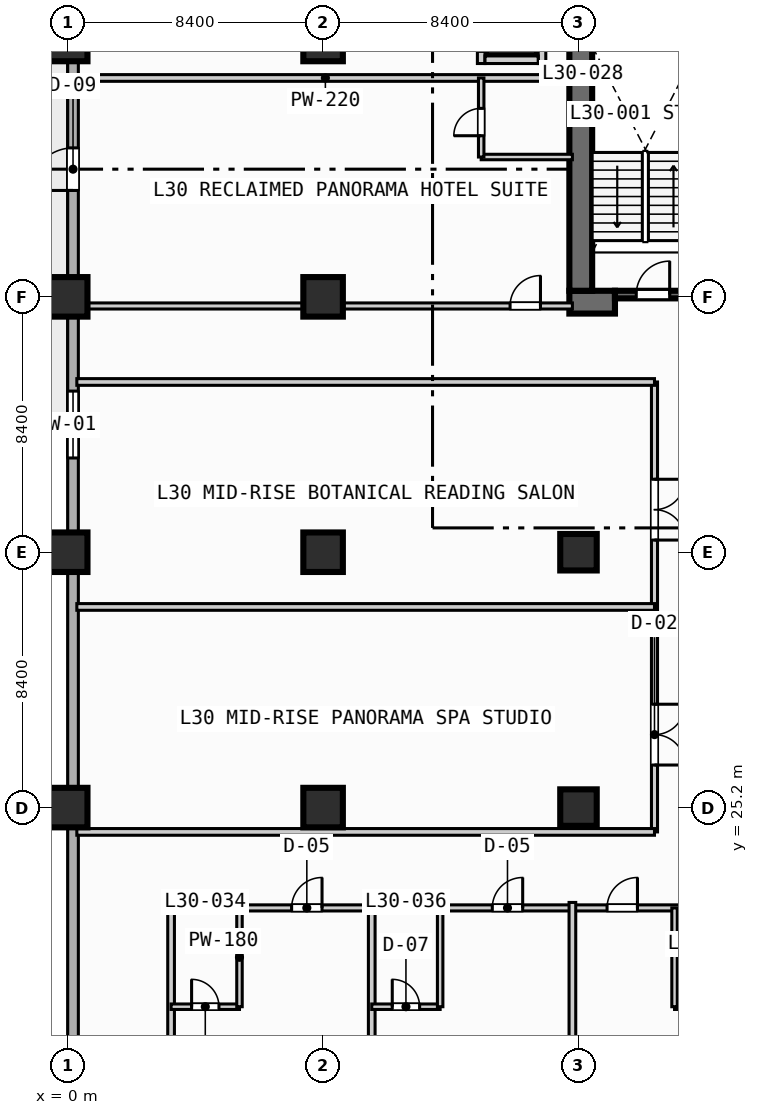
"""IFC4 building model, lengths in metres.
Left out: names, types, materials, properties, quantities, classifications, styles, units other than length and angle.
Written with IfcOpenShell. Run it as: python <this file> out.ifc"""

import sys

from ifc_helpers import new_model, si_unit, direction, frame, frame_2d, origin, origin_2d, place, context, subcontext, project, spatial, rectangle, extrude, element, fill, save


model = new_model("IFC4")
c1 = context("Model", 3, precision=1e-05, world=origin(), true_north=direction((0.0, 1.0)))
c2 = subcontext(c1, "Body", "Model", "MODEL_VIEW")
j1 = project(units=[si_unit("LENGTHUNIT", "METRE"), si_unit("PLANEANGLEUNIT", "RADIAN")], contexts=[c1])
p1 = place(None, origin())
s1 = spatial("IfcSite", under=j1, at=p1, CompositionType="ELEMENT")
p2 = place(p1, origin())
s2 = spatial("IfcBuilding", under=s1, at=p2, CompositionType="ELEMENT")
p3 = place(p2, frame((0.0, 0.0, 126.6)))
s3 = spatial("IfcBuildingStorey", under=s2, at=p3, CompositionType="ELEMENT", Elevation=126.6)
p4 = place(p3, frame((16.5, 41.825, 0.0), z_axis=(0.0, 0.0, 1.0), x_axis=(1.0, 0.0, 0.0)))
e1 = element("IfcWall", 1, at=p4, inside=s3, PredefinedType="SHEAR", context=c2, shape_type="SweptSolid", body=[
    extrude(rectangle(XDim=1.5, YDim=0.75, at=frame_2d((0.75, 0.0))), origin(), (0.0, 0.0, 1.0), 3.55),
])
p5 = place(p3, frame((16.875, 42.2, 0.0), z_axis=(0.0, 0.0, 1.0), x_axis=(0.0, 1.0, 0.0)))
e2 = element("IfcWall", 2, at=p5, inside=s3, PredefinedType="SHEAR", context=c2, shape_type="SweptSolid", body=[
    extrude(rectangle(XDim=16.35, YDim=0.75, at=frame_2d((8.175, 0.0))), origin(), (0.0, 0.0, 1.0), 3.55),
])
for number, where, z_axis, x_axis in (
    (3, (0.0, 25.2, 0.0), (0.0, 0.0, 1.0), (1.0, 0.0, 0.0)),
    (4, (0.0, 33.6, 0.0), (0.0, 0.0, 1.0), (1.0, 0.0, 0.0)),
    (5, (0.0, 42.0, 0.0), (0.0, 0.0, 1.0), (1.0, 0.0, 0.0)),
    (6, (0.0, 50.4, 0.0), (0.0, 0.0, 1.0), (1.0, 0.0, 0.0)),
    (7, (8.4, 25.2, 0.0), (0.0, 0.0, 1.0), (1.0, 0.0, 0.0)),
    (8, (8.4, 33.6, 0.0), (0.0, 0.0, 1.0), (1.0, 0.0, 0.0)),
    (9, (8.4, 42.0, 0.0), (0.0, 0.0, 1.0), (1.0, 0.0, 0.0)),
    (10, (8.4, 50.4, 0.0), (0.0, 0.0, 1.0), (1.0, 0.0, 0.0)),
):
    element("IfcColumn", number, at=place(p3, frame(where, z_axis=z_axis, x_axis=x_axis)), inside=s3, PredefinedType="COLUMN", context=c2, shape_type="SweptSolid", body=[
        extrude(rectangle(XDim=1.3, YDim=1.3, at=origin_2d()), origin(), (0.0, 0.0, 1.0), 3.8),
    ])
for number, where, z_axis, x_axis in (
    (11, (16.8, 25.2, 0.0), (0.0, 0.0, 1.0), (1.0, 0.0, 0.0)),
    (12, (16.8, 33.6, 0.0), (0.0, 0.0, 1.0), (1.0, 0.0, 0.0)),
):
    element("IfcColumn", number, at=place(p3, frame(where, z_axis=z_axis, x_axis=x_axis)), inside=s3, PredefinedType="COLUMN", context=c2, shape_type="SweptSolid", body=[
        extrude(rectangle(XDim=1.2, YDim=1.2, at=origin_2d()), origin(), (0.0, 0.0, 1.0), 3.8),
    ])
p6 = place(p3, frame((0.175, 3.175, 0.0), z_axis=(0.0, 0.0, 1.0), x_axis=(0.0, 1.0, 0.0)))
e13 = element("IfcWall", 13, at=p6, inside=s3, PredefinedType="STANDARD", context=c2, shape_type="SweptSolid", body=[
    extrude(rectangle(XDim=86.05, YDim=0.35, at=frame_2d((43.025, 0.0))), origin(), (0.0, 0.0, 1.0), 3.55),
])
p7 = place(p6, frame((42.325, 0.0, 0.0)))
e14 = element("IfcOpeningElement", 14, at=p7, cuts=e13, PredefinedType="OPENING", context=c2, shape_type="SweptSolid", body=[
    extrude(rectangle(XDim=1.4, YDim=2.2, at=frame_2d((0.7, 1.1))), frame((0.0, 0.185, 0.0), z_axis=(0.0, -1.0, 0.0), x_axis=(1.0, 0.0, 0.0)), (0.0, 0.0, 1.0), 0.37),
])
p8 = place(p6, frame((33.525, 0.0, 0.85)))
e15 = element("IfcOpeningElement", 15, at=p8, cuts=e13, PredefinedType="OPENING", context=c2, shape_type="SweptSolid", body=[
    extrude(rectangle(XDim=2.2, YDim=1.8, at=frame_2d((1.1, 0.9))), frame((0.0, 0.185, 0.0), z_axis=(0.0, -1.0, 0.0), x_axis=(1.0, 0.0, 0.0)), (0.0, 0.0, 1.0), 0.37),
])
p9 = place(p6, frame((58.725, 0.0, 0.85)))
e16 = element("IfcOpeningElement", 16, at=p9, cuts=e13, PredefinedType="OPENING", context=c2, shape_type="SweptSolid", body=[
    extrude(rectangle(XDim=2.2, YDim=1.8, at=frame_2d((1.1, 0.9))), frame((0.0, 0.185, 0.0), z_axis=(0.0, -1.0, 0.0), x_axis=(1.0, 0.0, 0.0)), (0.0, 0.0, 1.0), 0.37),
])
p10 = place(p6, frame((65.125, 0.0, 0.85)))
e17 = element("IfcOpeningElement", 17, at=p10, cuts=e13, PredefinedType="OPENING", context=c2, shape_type="SweptSolid", body=[
    extrude(rectangle(XDim=1.8, YDim=1.8, at=frame_2d((0.9, 0.9))), frame((0.0, 0.185, 0.0), z_axis=(0.0, -1.0, 0.0), x_axis=(1.0, 0.0, 0.0)), (0.0, 0.0, 1.0), 0.37),
])
p11 = place(p6, frame((73.275, 0.0, 0.85)))
e18 = element("IfcOpeningElement", 18, at=p11, cuts=e13, PredefinedType="OPENING", context=c2, shape_type="SweptSolid", body=[
    extrude(rectangle(XDim=1.8, YDim=1.8, at=frame_2d((0.9, 0.9))), frame((0.0, 0.185, 0.0), z_axis=(0.0, -1.0, 0.0), x_axis=(1.0, 0.0, 0.0)), (0.0, 0.0, 1.0), 0.37),
])
p12 = place(p6, frame((81.625, 0.0, 0.85)))
e19 = element("IfcOpeningElement", 19, at=p12, cuts=e13, PredefinedType="OPENING", context=c2, shape_type="SweptSolid", body=[
    extrude(rectangle(XDim=1.8, YDim=1.8, at=frame_2d((0.9, 0.9))), frame((0.0, 0.185, 0.0), z_axis=(0.0, -1.0, 0.0), x_axis=(1.0, 0.0, 0.0)), (0.0, 0.0, 1.0), 0.37),
])
p13 = place(p3, frame((18.0, 42.075, 0.0), z_axis=(0.0, 0.0, 1.0), x_axis=(1.0, 0.0, 0.0)))
e20 = element("IfcWall", 20, at=p13, inside=s3, PredefinedType="SOLIDWALL", context=c2, shape_type="SweptSolid", body=[
    extrude(rectangle(XDim=2.5, YDim=0.25, at=frame_2d((1.25, 0.0))), origin(), (0.0, 0.0, 1.0), 3.55),
])
p14 = place(p13, frame((0.7, 0.0, 0.0)))
e21 = element("IfcOpeningElement", 21, at=p14, cuts=e20, PredefinedType="OPENING", context=c2, shape_type="SweptSolid", body=[
    extrude(rectangle(XDim=1.1, YDim=2.15, at=frame_2d((0.55, 1.075))), frame((0.0, 0.135, 0.0), z_axis=(0.0, -1.0, 0.0), x_axis=(1.0, 0.0, 0.0)), (0.0, 0.0, 1.0), 0.27),
])
p15 = place(p3, frame((13.6, 49.675, 0.0), z_axis=(0.0, 0.0, 1.0), x_axis=(0.0, 1.0, 0.0)))
e22 = element("IfcWall", 22, at=p15, inside=s3, PredefinedType="SOLIDWALL", context=c2, shape_type="SweptSolid", body=[
    extrude(rectangle(XDim=2.75, YDim=0.25, at=frame_2d((1.375, 0.0))), origin(), (0.0, 0.0, 1.0), 3.55),
])
p16 = place(p15, frame((0.4, 0.0, 0.0)))
e23 = element("IfcOpeningElement", 23, at=p16, cuts=e22, PredefinedType="OPENING", context=c2, shape_type="SweptSolid", body=[
    extrude(rectangle(XDim=1.1, YDim=2.15, at=frame_2d((0.55, 1.075))), frame((0.0, 0.135, 0.0), z_axis=(0.0, -1.0, 0.0), x_axis=(1.0, 0.0, 0.0)), (0.0, 0.0, 1.0), 0.27),
])
p17 = place(p3, frame((15.6, 49.675, 0.0), z_axis=(0.0, 0.0, 1.0), x_axis=(0.0, 1.0, 0.0)))
e24 = element("IfcWall", 24, at=p17, inside=s3, PredefinedType="SOLIDWALL", context=c2, shape_type="SweptSolid", body=[
    extrude(rectangle(XDim=2.75, YDim=0.25, at=frame_2d((1.375, 0.0))), origin(), (0.0, 0.0, 1.0), 3.55),
])
p18 = place(p3, frame((13.725, 49.8, 0.0), z_axis=(0.0, 0.0, 1.0), x_axis=(1.0, 0.0, 0.0)))
e25 = element("IfcWall", 25, at=p18, inside=s3, PredefinedType="SOLIDWALL", context=c2, shape_type="SweptSolid", body=[
    extrude(rectangle(XDim=1.75, YDim=0.25, at=frame_2d((0.875, 0.0))), origin(), (0.0, 0.0, 1.0), 3.55),
])
p19 = place(p3, frame((0.35, 41.7, 0.0), z_axis=(0.0, 0.0, 1.0), x_axis=(1.0, 0.0, 0.0)))
e26 = element("IfcWall", 26, at=p19, inside=s3, PredefinedType="PARTITIONING", context=c2, shape_type="SweptSolid", body=[
    extrude(rectangle(XDim=16.25, YDim=0.2, at=frame_2d((8.125, 0.0))), origin(), (0.0, 0.0, 1.0), 2.8),
])
p20 = place(p19, frame((14.2, 0.0, 0.0)))
e27 = element("IfcOpeningElement", 27, at=p20, cuts=e26, PredefinedType="OPENING", context=c2, shape_type="SweptSolid", body=[
    extrude(rectangle(XDim=1.0, YDim=2.15, at=frame_2d((0.5, 1.075))), frame((0.0, 0.11, 0.0), z_axis=(0.0, -1.0, 0.0), x_axis=(1.0, 0.0, 0.0)), (0.0, 0.0, 1.0), 0.22),
])
p21 = place(p3, frame((0.35, 49.2, 0.0), z_axis=(0.0, 0.0, 1.0), x_axis=(1.0, 0.0, 0.0)))
e28 = element("IfcWall", 28, at=p21, inside=s3, PredefinedType="PARTITIONING", context=c2, shape_type="SweptSolid", body=[
    extrude(rectangle(XDim=16.25, YDim=0.22, at=frame_2d((8.125, 0.0))), origin(), (0.0, 0.0, 1.0), 3.55),
])
p22 = place(p3, frame((13.6, 46.6, 0.0), z_axis=(0.0, 0.0, 1.0), x_axis=(1.0, 0.0, 0.0)))
e29 = element("IfcWall", 29, at=p22, inside=s3, PredefinedType="PLUMBINGWALL", context=c2, shape_type="SweptSolid", body=[
    extrude(rectangle(XDim=3.0, YDim=0.18, at=frame_2d((1.5, 0.0))), origin(), (0.0, 0.0, 1.0), 3.55),
])
p23 = place(p3, frame((13.6, 46.6, 0.0), z_axis=(0.0, 0.0, 1.0), x_axis=(0.0, 1.0, 0.0)))
e30 = element("IfcWall", 30, at=p23, inside=s3, PredefinedType="PLUMBINGWALL", context=c2, shape_type="SweptSolid", body=[
    extrude(rectangle(XDim=2.6, YDim=0.18, at=frame_2d((1.3, 0.0))), origin(), (0.0, 0.0, 1.0), 3.55),
])
p24 = place(p23, frame((0.7, 0.0, 0.0)))
e31 = element("IfcOpeningElement", 31, at=p24, cuts=e30, PredefinedType="OPENING", context=c2, shape_type="SweptSolid", body=[
    extrude(rectangle(XDim=0.9, YDim=2.1, at=frame_2d((0.45, 1.05))), frame((0.0, 0.1, 0.0), z_axis=(0.0, -1.0, 0.0), x_axis=(1.0, 0.0, 0.0)), (0.0, 0.0, 1.0), 0.2),
])
p25 = place(p3, frame((3.4, 21.9, 0.0), z_axis=(0.0, 0.0, 1.0), x_axis=(1.0, 0.0, 0.0)))
e32 = element("IfcWall", 32, at=p25, inside=s3, PredefinedType="PARTITIONING", context=c2, shape_type="SweptSolid", body=[
    extrude(rectangle(XDim=35.8, YDim=0.2, at=frame_2d((17.9, 0.0))), origin(), (0.0, 0.0, 1.0), 3.55),
])
p26 = place(p25, frame((3.965, 0.0, 0.0)))
e33 = element("IfcOpeningElement", 33, at=p26, cuts=e32, PredefinedType="OPENING", context=c2, shape_type="SweptSolid", body=[
    extrude(rectangle(XDim=1.0, YDim=2.15, at=frame_2d((0.5, 1.075))), frame((0.0, 0.11, 0.0), z_axis=(0.0, -1.0, 0.0), x_axis=(1.0, 0.0, 0.0)), (0.0, 0.0, 1.0), 0.22),
])
p27 = place(p25, frame((10.565, 0.0, 0.0)))
e34 = element("IfcOpeningElement", 34, at=p27, cuts=e32, PredefinedType="OPENING", context=c2, shape_type="SweptSolid", body=[
    extrude(rectangle(XDim=1.0, YDim=2.15, at=frame_2d((0.5, 1.075))), frame((0.0, 0.11, 0.0), z_axis=(0.0, -1.0, 0.0), x_axis=(1.0, 0.0, 0.0)), (0.0, 0.0, 1.0), 0.22),
])
p28 = place(p25, frame((14.34, 0.0, 0.0)))
e35 = element("IfcOpeningElement", 35, at=p28, cuts=e32, PredefinedType="OPENING", context=c2, shape_type="SweptSolid", body=[
    extrude(rectangle(XDim=1.0, YDim=2.15, at=frame_2d((0.5, 1.075))), frame((0.0, 0.11, 0.0), z_axis=(0.0, -1.0, 0.0), x_axis=(1.0, 0.0, 0.0)), (0.0, 0.0, 1.0), 0.22),
])
p29 = place(p25, frame((22.26, 0.0, 0.0)))
e36 = element("IfcOpeningElement", 36, at=p29, cuts=e32, PredefinedType="OPENING", context=c2, shape_type="SweptSolid", body=[
    extrude(rectangle(XDim=1.0, YDim=2.15, at=frame_2d((0.5, 1.075))), frame((0.0, 0.11, 0.0), z_axis=(0.0, -1.0, 0.0), x_axis=(1.0, 0.0, 0.0)), (0.0, 0.0, 1.0), 0.22),
])
p30 = place(p25, frame((27.915, 0.0, 0.0)))
e37 = element("IfcOpeningElement", 37, at=p30, cuts=e32, PredefinedType="OPENING", context=c2, shape_type="SweptSolid", body=[
    extrude(rectangle(XDim=1.0, YDim=2.15, at=frame_2d((0.5, 1.075))), frame((0.0, 0.11, 0.0), z_axis=(0.0, -1.0, 0.0), x_axis=(1.0, 0.0, 0.0)), (0.0, 0.0, 1.0), 0.22),
])
p31 = place(p25, frame((31.285, 0.0, 0.0)))
e38 = element("IfcOpeningElement", 38, at=p31, cuts=e32, PredefinedType="OPENING", context=c2, shape_type="SweptSolid", body=[
    extrude(rectangle(XDim=1.0, YDim=2.15, at=frame_2d((0.5, 1.075))), frame((0.0, 0.11, 0.0), z_axis=(0.0, -1.0, 0.0), x_axis=(1.0, 0.0, 0.0)), (0.0, 0.0, 1.0), 0.22),
])
p32 = place(p3, frame((3.4, 0.2, 0.0), z_axis=(0.0, 0.0, 1.0), x_axis=(0.0, 1.0, 0.0)))
e39 = element("IfcWall", 39, at=p32, inside=s3, PredefinedType="PARTITIONING", context=c2, shape_type="SweptSolid", body=[
    extrude(rectangle(XDim=21.88, YDim=0.22, at=frame_2d((10.94, 0.0))), origin(), (0.0, 0.0, 1.0), 3.55),
])
p33 = place(p3, frame((3.4, 18.65, 0.0), z_axis=(0.0, 0.0, 1.0), x_axis=(1.0, 0.0, 0.0)))
e40 = element("IfcWall", 40, at=p33, inside=s3, PredefinedType="PLUMBINGWALL", context=c2, shape_type="SweptSolid", body=[
    extrude(rectangle(XDim=2.25, YDim=0.18, at=frame_2d((1.125, 0.0))), origin(), (0.0, 0.0, 1.0), 3.55),
])
p34 = place(p33, frame((0.675, 0.0, 0.0)))
e41 = element("IfcOpeningElement", 41, at=p34, cuts=e40, PredefinedType="OPENING", context=c2, shape_type="SweptSolid", body=[
    extrude(rectangle(XDim=0.9, YDim=2.1, at=frame_2d((0.45, 1.05))), frame((0.0, 0.1, 0.0), z_axis=(0.0, -1.0, 0.0), x_axis=(1.0, 0.0, 0.0)), (0.0, 0.0, 1.0), 0.2),
])
p35 = place(p3, frame((5.65, 18.65, 0.0), z_axis=(0.0, 0.0, 1.0), x_axis=(0.0, 1.0, 0.0)))
e42 = element("IfcWall", 42, at=p35, inside=s3, PredefinedType="PLUMBINGWALL", context=c2, shape_type="SweptSolid", body=[
    extrude(rectangle(XDim=3.25, YDim=0.18, at=frame_2d((1.625, 0.0))), origin(), (0.0, 0.0, 1.0), 3.55),
])
p36 = place(p3, frame((10.0, 0.2, 0.0), z_axis=(0.0, 0.0, 1.0), x_axis=(0.0, 1.0, 0.0)))
e43 = element("IfcWall", 43, at=p36, inside=s3, PredefinedType="PARTITIONING", context=c2, shape_type="SweptSolid", body=[
    extrude(rectangle(XDim=21.88, YDim=0.22, at=frame_2d((10.94, 0.0))), origin(), (0.0, 0.0, 1.0), 3.55),
])
p37 = place(p3, frame((10.0, 18.65, 0.0), z_axis=(0.0, 0.0, 1.0), x_axis=(1.0, 0.0, 0.0)))
e44 = element("IfcWall", 44, at=p37, inside=s3, PredefinedType="PLUMBINGWALL", context=c2, shape_type="SweptSolid", body=[
    extrude(rectangle(XDim=2.25, YDim=0.18, at=frame_2d((1.125, 0.0))), origin(), (0.0, 0.0, 1.0), 3.55),
])
p38 = place(p37, frame((0.675, 0.0, 0.0)))
e45 = element("IfcOpeningElement", 45, at=p38, cuts=e44, PredefinedType="OPENING", context=c2, shape_type="SweptSolid", body=[
    extrude(rectangle(XDim=0.9, YDim=2.1, at=frame_2d((0.45, 1.05))), frame((0.0, 0.1, 0.0), z_axis=(0.0, -1.0, 0.0), x_axis=(1.0, 0.0, 0.0)), (0.0, 0.0, 1.0), 0.2),
])
p39 = place(p3, frame((12.25, 18.65, 0.0), z_axis=(0.0, 0.0, 1.0), x_axis=(0.0, 1.0, 0.0)))
e46 = element("IfcWall", 46, at=p39, inside=s3, PredefinedType="PLUMBINGWALL", context=c2, shape_type="SweptSolid", body=[
    extrude(rectangle(XDim=3.25, YDim=0.18, at=frame_2d((1.625, 0.0))), origin(), (0.0, 0.0, 1.0), 3.55),
])
p40 = place(p3, frame((16.6, 0.2, 0.0), z_axis=(0.0, 0.0, 1.0), x_axis=(0.0, 1.0, 0.0)))
e47 = element("IfcWall", 47, at=p40, inside=s3, PredefinedType="PARTITIONING", context=c2, shape_type="SweptSolid", body=[
    extrude(rectangle(XDim=21.88, YDim=0.22, at=frame_2d((10.94, 0.0))), origin(), (0.0, 0.0, 1.0), 2.8),
])
p41 = place(p3, frame((19.96, 18.65, 0.0), z_axis=(0.0, 0.0, 1.0), x_axis=(1.0, 0.0, 0.0)))
e48 = element("IfcWall", 48, at=p41, inside=s3, PredefinedType="PLUMBINGWALL", context=c2, shape_type="SweptSolid", body=[
    extrude(rectangle(XDim=4.48, YDim=0.18, at=frame_2d((2.24, 0.0))), origin(), (0.0, 0.0, 1.0), 3.55),
])
p42 = place(p41, frame((0.67, 0.0, 0.0)))
e49 = element("IfcOpeningElement", 49, at=p42, cuts=e48, PredefinedType="OPENING", context=c2, shape_type="SweptSolid", body=[
    extrude(rectangle(XDim=0.9, YDim=2.1, at=frame_2d((0.45, 1.05))), frame((0.0, 0.1, 0.0), z_axis=(0.0, -1.0, 0.0), x_axis=(1.0, 0.0, 0.0)), (0.0, 0.0, 1.0), 0.2),
])
p43 = place(p41, frame((2.91, 0.0, 0.0)))
e50 = element("IfcOpeningElement", 50, at=p43, cuts=e48, PredefinedType="OPENING", context=c2, shape_type="SweptSolid", body=[
    extrude(rectangle(XDim=0.9, YDim=2.1, at=frame_2d((0.45, 1.05))), frame((0.0, 0.1, 0.0), z_axis=(0.0, -1.0, 0.0), x_axis=(1.0, 0.0, 0.0)), (0.0, 0.0, 1.0), 0.2),
])
p44 = place(p3, frame((19.96, 18.65, 0.0), z_axis=(0.0, 0.0, 1.0), x_axis=(0.0, 1.0, 0.0)))
e51 = element("IfcWall", 51, at=p44, inside=s3, PredefinedType="PLUMBINGWALL", context=c2, shape_type="SweptSolid", body=[
    extrude(rectangle(XDim=3.25, YDim=0.18, at=frame_2d((1.625, 0.0))), origin(), (0.0, 0.0, 1.0), 3.55),
])
p45 = place(p3, frame((19.3, 24.4, 0.0), z_axis=(0.0, 0.0, 1.0), x_axis=(0.0, 1.0, 0.0)))
e52 = element("IfcWall", 52, at=p45, inside=s3, PredefinedType="PARTITIONING", context=c2, shape_type="SweptSolid", body=[
    extrude(rectangle(XDim=14.8, YDim=0.2, at=frame_2d((7.4, 0.0))), origin(), (0.0, 0.0, 1.0), 3.55),
])
p46 = place(p45, frame((2.2, 0.0, 0.0)))
e53 = element("IfcOpeningElement", 53, at=p46, cuts=e52, PredefinedType="OPENING", context=c2, shape_type="SweptSolid", body=[
    extrude(rectangle(XDim=2.0, YDim=2.15, at=frame_2d((1.0, 1.075))), frame((0.0, 0.11, 0.0), z_axis=(0.0, -1.0, 0.0), x_axis=(1.0, 0.0, 0.0)), (0.0, 0.0, 1.0), 0.22),
])
p47 = place(p45, frame((9.6, 0.0, 0.0)))
e54 = element("IfcOpeningElement", 54, at=p47, cuts=e52, PredefinedType="OPENING", context=c2, shape_type="SweptSolid", body=[
    extrude(rectangle(XDim=2.0, YDim=2.15, at=frame_2d((1.0, 1.075))), frame((0.0, 0.11, 0.0), z_axis=(0.0, -1.0, 0.0), x_axis=(1.0, 0.0, 0.0)), (0.0, 0.0, 1.0), 0.22),
])
for number, where, z_axis, x_axis in (
    (55, (0.3, 24.4, 0.0), (0.0, 0.0, 1.0), (1.0, 0.0, 0.0)),
    (56, (0.3, 31.8, 0.0), (0.0, 0.0, 1.0), (1.0, 0.0, 0.0)),
    (57, (0.3, 39.2, 0.0), (0.0, 0.0, 1.0), (1.0, 0.0, 0.0)),
):
    element("IfcWall", number, at=place(p3, frame(where, z_axis=z_axis, x_axis=x_axis)), inside=s3, PredefinedType="PARTITIONING", context=c2, shape_type="SweptSolid", body=[
        extrude(rectangle(XDim=19.0, YDim=0.22, at=frame_2d((9.5, 0.0))), origin(), (0.0, 0.0, 1.0), 3.55),
    ])
p48 = place(p7, origin())
e58 = element("IfcDoor", 58, at=p48, inside=s3, OperationType="SINGLE_SWING_LEFT", PredefinedType="DOOR", context=c2, shape_type="SweptSolid", body=[
    extrude(rectangle(XDim=1.4, YDim=2.2, at=frame_2d((0.7, 1.1))), frame((0.0, 0.025, 0.0), z_axis=(0.0, -1.0, 0.0), x_axis=(1.0, 0.0, 0.0)), (0.0, 0.0, 1.0), 0.05),
])
fill(e14, e58)
p49 = place(p8, origin())
e59 = element("IfcWindow", 59, at=p49, inside=s3, PartitioningType="SINGLE_PANEL", PredefinedType="WINDOW", context=c2, shape_type="SweptSolid", body=[
    extrude(rectangle(XDim=2.2, YDim=1.8, at=frame_2d((1.1, 0.9))), frame((0.0, 0.03, 0.0), z_axis=(0.0, -1.0, 0.0), x_axis=(1.0, 0.0, 0.0)), (0.0, 0.0, 1.0), 0.06),
])
fill(e15, e59)
p50 = place(p14, origin())
e60 = element("IfcDoor", 60, at=p50, inside=s3, OperationType="SINGLE_SWING_RIGHT", PredefinedType="DOOR", context=c2, shape_type="SweptSolid", body=[
    extrude(rectangle(XDim=1.1, YDim=2.15, at=frame_2d((0.55, 1.075))), frame((0.0, 0.025, 0.0), z_axis=(0.0, -1.0, 0.0), x_axis=(1.0, 0.0, 0.0)), (0.0, 0.0, 1.0), 0.05),
])
fill(e21, e60)
p51 = place(p20, origin())
e61 = element("IfcDoor", 61, at=p51, inside=s3, OperationType="SINGLE_SWING_RIGHT", PredefinedType="DOOR", context=c2, shape_type="SweptSolid", body=[
    extrude(rectangle(XDim=1.0, YDim=2.15, at=frame_2d((0.5, 1.075))), frame((0.0, 0.025, 0.0), z_axis=(0.0, -1.0, 0.0), x_axis=(1.0, 0.0, 0.0)), (0.0, 0.0, 1.0), 0.05),
])
fill(e27, e61)
p52 = place(p24, origin())
e62 = element("IfcDoor", 62, at=p52, inside=s3, OperationType="SINGLE_SWING_LEFT", PredefinedType="DOOR", context=c2, shape_type="SweptSolid", body=[
    extrude(rectangle(XDim=0.9, YDim=2.1, at=frame_2d((0.45, 1.05))), frame((0.0, 0.025, 0.0), z_axis=(0.0, -1.0, 0.0), x_axis=(1.0, 0.0, 0.0)), (0.0, 0.0, 1.0), 0.05),
])
fill(e31, e62)
p53 = place(p26, origin())
e63 = element("IfcDoor", 63, at=p53, inside=s3, OperationType="SINGLE_SWING_RIGHT", PredefinedType="DOOR", context=c2, shape_type="SweptSolid", body=[
    extrude(rectangle(XDim=1.0, YDim=2.15, at=frame_2d((0.5, 1.075))), frame((0.0, 0.025, 0.0), z_axis=(0.0, -1.0, 0.0), x_axis=(1.0, 0.0, 0.0)), (0.0, 0.0, 1.0), 0.05),
])
fill(e33, e63)
p54 = place(p27, origin())
e64 = element("IfcDoor", 64, at=p54, inside=s3, OperationType="SINGLE_SWING_RIGHT", PredefinedType="DOOR", context=c2, shape_type="SweptSolid", body=[
    extrude(rectangle(XDim=1.0, YDim=2.15, at=frame_2d((0.5, 1.075))), frame((0.0, 0.025, 0.0), z_axis=(0.0, -1.0, 0.0), x_axis=(1.0, 0.0, 0.0)), (0.0, 0.0, 1.0), 0.05),
])
fill(e34, e64)
p55 = place(p28, origin())
e65 = element("IfcDoor", 65, at=p55, inside=s3, OperationType="SINGLE_SWING_RIGHT", PredefinedType="DOOR", context=c2, shape_type="SweptSolid", body=[
    extrude(rectangle(XDim=1.0, YDim=2.15, at=frame_2d((0.5, 1.075))), frame((0.0, 0.025, 0.0), z_axis=(0.0, -1.0, 0.0), x_axis=(1.0, 0.0, 0.0)), (0.0, 0.0, 1.0), 0.05),
])
fill(e35, e65)
p56 = place(p34, origin())
e66 = element("IfcDoor", 66, at=p56, inside=s3, OperationType="SINGLE_SWING_LEFT", PredefinedType="DOOR", context=c2, shape_type="SweptSolid", body=[
    extrude(rectangle(XDim=0.9, YDim=2.1, at=frame_2d((0.45, 1.05))), frame((0.0, 0.025, 0.0), z_axis=(0.0, -1.0, 0.0), x_axis=(1.0, 0.0, 0.0)), (0.0, 0.0, 1.0), 0.05),
])
fill(e41, e66)
p57 = place(p38, origin())
e67 = element("IfcDoor", 67, at=p57, inside=s3, OperationType="SINGLE_SWING_LEFT", PredefinedType="DOOR", context=c2, shape_type="SweptSolid", body=[
    extrude(rectangle(XDim=0.9, YDim=2.1, at=frame_2d((0.45, 1.05))), frame((0.0, 0.025, 0.0), z_axis=(0.0, -1.0, 0.0), x_axis=(1.0, 0.0, 0.0)), (0.0, 0.0, 1.0), 0.05),
])
fill(e45, e67)
p58 = place(p46, origin())
e68 = element("IfcDoor", 68, at=p58, inside=s3, OperationType="SINGLE_SWING_RIGHT", PredefinedType="DOOR", context=c2, shape_type="SweptSolid", body=[
    extrude(rectangle(XDim=2.0, YDim=2.15, at=frame_2d((1.0, 1.075))), frame((0.0, 0.025, 0.0), z_axis=(0.0, -1.0, 0.0), x_axis=(1.0, 0.0, 0.0)), (0.0, 0.0, 1.0), 0.05),
])
fill(e53, e68)
p59 = place(p47, origin())
e69 = element("IfcDoor", 69, at=p59, inside=s3, OperationType="SINGLE_SWING_RIGHT", PredefinedType="DOOR", context=c2, shape_type="SweptSolid", body=[
    extrude(rectangle(XDim=2.0, YDim=2.15, at=frame_2d((1.0, 1.075))), frame((0.0, 0.025, 0.0), z_axis=(0.0, -1.0, 0.0), x_axis=(1.0, 0.0, 0.0)), (0.0, 0.0, 1.0), 0.05),
])
fill(e54, e69)
save(model, sys.argv[1])
